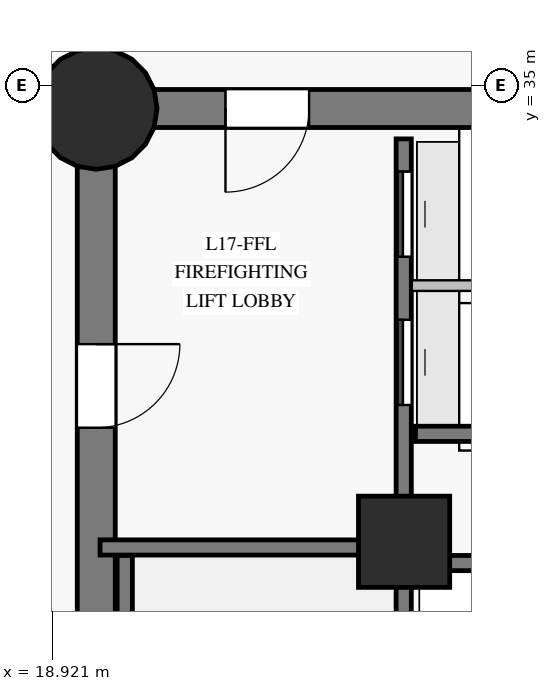
"""IFC4 building model, lengths in metres.
Left out: names, types, materials, properties, quantities, classifications, styles, units other than length and angle.
Written with IfcOpenShell. Run it as: python <this file> out.ifc"""

import sys

from ifc_helpers import new_model, si_unit, direction, frame, frame_2d, origin, origin_with_axes, origin_2d, place, context, subcontext, project, spatial, rectangle, circle, extrude, source, transform, mapped, element, fill, save


model = new_model("IFC4")
c1 = context("Model", 3, precision=1e-05, world=origin(), true_north=direction((0.0, 1.0)))
c2 = subcontext(c1, "Body", "Model", "MODEL_VIEW")
j1 = project(units=[si_unit("LENGTHUNIT", "METRE"), si_unit("PLANEANGLEUNIT", "RADIAN")], contexts=[c1])
p1 = place(None, origin())
s1 = spatial("IfcSite", under=j1, at=p1, CompositionType="ELEMENT")
p2 = place(p1, origin())
s2 = spatial("IfcBuilding", under=s1, at=p2, CompositionType="ELEMENT")
p3 = place(p2, frame((0.0, 0.0, 66.1)))
s3 = spatial("IfcBuildingStorey", under=s2, at=p3, CompositionType="ELEMENT", Elevation=66.1)
p4 = place(p3, frame((26.55, 34.7, 0.0), z_axis=(0.0, 0.0, 1.0), x_axis=(-1.0, 0.0, 0.0)))
e1 = element("IfcWall", 1, at=p4, inside=s3, PredefinedType="SHEAR", context=c2, shape_type="SweptSolid", body=[
    extrude(rectangle(XDim=7.05, YDim=0.5, at=frame_2d((3.525, 0.0))), origin(), (0.0, 0.0, 1.0), 3.35),
])
p5 = place(p4, frame((4.25, 0.0, 0.0)))
e2 = element("IfcOpeningElement", 2, at=p5, cuts=e1, PredefinedType="OPENING", context=c2, shape_type="SweptSolid", body=[
    extrude(rectangle(XDim=1.1, YDim=2.15, at=frame_2d((0.55, 1.075))), frame((0.0, 0.26, 0.0), z_axis=(0.0, -1.0, 0.0), x_axis=(1.0, 0.0, 0.0)), (0.0, 0.0, 1.0), 0.52),
])
p6 = place(p3, frame((19.5, 34.7, 0.0), z_axis=(0.0, 0.0, 1.0), x_axis=(0.0, -1.0, 0.0)))
e3 = element("IfcWall", 3, at=p6, inside=s3, PredefinedType="SHEAR", context=c2, shape_type="SweptSolid", body=[
    extrude(rectangle(XDim=16.4, YDim=0.5, at=frame_2d((8.2, 0.0))), origin(), (0.0, 0.0, 1.0), 3.35),
])
p7 = place(p6, frame((3.1, 0.0, 0.0)))
e4 = element("IfcOpeningElement", 4, at=p7, cuts=e3, PredefinedType="OPENING", context=c2, shape_type="SweptSolid", body=[
    extrude(rectangle(XDim=1.1, YDim=2.15, at=frame_2d((0.55, 1.075))), frame((0.0, 0.26, 0.0), z_axis=(0.0, -1.0, 0.0), x_axis=(1.0, 0.0, 0.0)), (0.0, 0.0, 1.0), 0.52),
])
m1 = source(origin_with_axes(), c2, "Body", "SweptSolid", [
    extrude(circle(Radius=0.8, at=origin_2d()), origin(), (0.0, 0.0, 1.0), 3.6),
])
p8 = place(p3, frame((19.5, 34.7, 0.0), z_axis=(0.0, 0.0, 1.0), x_axis=(1.0, 0.0, 0.0)))
e5 = element("IfcColumn", 5, at=p8, inside=s3, PredefinedType="COLUMN", context=c2, shape_type="MappedRepresentation", body=[
    mapped(m1, transform((0.0, 0.0, 0.0), scale=1.0)),
])
m2 = source(origin_with_axes(), c2, "Body", "SweptSolid", [
    extrude(rectangle(XDim=1.2, YDim=1.2, at=origin_2d()), origin(), (0.0, 0.0, 1.0), 3.6),
])
p9 = place(p3, frame((23.55, 29.0, 0.0), z_axis=(0.0, 0.0, 1.0), x_axis=(1.0, 0.0, 0.0)))
e6 = element("IfcColumn", 6, at=p9, inside=s3, PredefinedType="COLUMN", context=c2, shape_type="MappedRepresentation", body=[
    mapped(m2, transform((0.0, 0.0, 0.0), scale=1.0)),
])
p10 = place(p3, frame((23.545, 18.7, 0.0), z_axis=(0.0, 0.0, 1.0), x_axis=(0.0, 1.0, 0.0)))
e7 = element("IfcWall", 7, at=p10, inside=s3, PredefinedType="SHEAR", context=c2, shape_type="SweptSolid", body=[
    extrude(rectangle(XDim=15.6, YDim=0.2, at=frame_2d((7.8, 0.0))), origin(), (0.0, 0.0, 1.0), 3.35),
])
p11 = place(p10, frame((2.75, 0.0, 0.0)))
e8 = element("IfcOpeningElement", 8, at=p11, cuts=e7, PredefinedType="OPENING", context=c2, shape_type="SweptSolid", body=[
    extrude(rectangle(XDim=1.15, YDim=2.15, at=frame_2d((0.575, 1.075))), frame((0.0, 0.11, 0.0), z_axis=(0.0, -1.0, 0.0), x_axis=(1.0, 0.0, 0.0)), (0.0, 0.0, 1.0), 0.22),
])
p12 = place(p10, frame((0.14, 0.0, 0.0)))
e9 = element("IfcOpeningElement", 9, at=p12, cuts=e7, PredefinedType="OPENING", context=c2, shape_type="SweptSolid", body=[
    extrude(rectangle(XDim=0.88, YDim=2.1, at=frame_2d((0.44, 1.05))), frame((0.0, 0.11, 0.0), z_axis=(0.0, -1.0, 0.0), x_axis=(1.0, 0.0, 0.0)), (0.0, 0.0, 1.0), 0.22),
])
p13 = place(p10, frame((1.36, 0.0, 0.0)))
e10 = element("IfcOpeningElement", 10, at=p13, cuts=e7, PredefinedType="OPENING", context=c2, shape_type="SweptSolid", body=[
    extrude(rectangle(XDim=0.88, YDim=2.1, at=frame_2d((0.44, 1.05))), frame((0.0, 0.11, 0.0), z_axis=(0.0, -1.0, 0.0), x_axis=(1.0, 0.0, 0.0)), (0.0, 0.0, 1.0), 0.22),
])
p14 = place(p10, frame((12.1, 0.0, 0.0)))
e11 = element("IfcOpeningElement", 11, at=p14, cuts=e7, PredefinedType="OPENING", context=c2, shape_type="SweptSolid", body=[
    extrude(rectangle(XDim=1.12, YDim=2.15, at=frame_2d((0.56, 1.075))), frame((0.0, 0.11, 0.0), z_axis=(0.0, -1.0, 0.0), x_axis=(1.0, 0.0, 0.0)), (0.0, 0.0, 1.0), 0.22),
])
p15 = place(p10, frame((14.05, 0.0, 0.0)))
e12 = element("IfcOpeningElement", 12, at=p15, cuts=e7, PredefinedType="OPENING", context=c2, shape_type="SweptSolid", body=[
    extrude(rectangle(XDim=1.12, YDim=2.15, at=frame_2d((0.56, 1.075))), frame((0.0, 0.11, 0.0), z_axis=(0.0, -1.0, 0.0), x_axis=(1.0, 0.0, 0.0)), (0.0, 0.0, 1.0), 0.22),
])
p16 = place(p3, frame((23.7, 28.72, 0.0), z_axis=(0.0, 0.0, 1.0), x_axis=(1.0, 0.0, 0.0)))
e13 = element("IfcWall", 13, at=p16, inside=s3, PredefinedType="SHEAR", context=c2, shape_type="SweptSolid", body=[
    extrude(rectangle(XDim=9.6, YDim=0.2, at=frame_2d((4.8, 0.0))), origin(), (0.0, 0.0, 1.0), 3.35),
])
p17 = place(p3, frame((19.875, 21.32, 0.0), z_axis=(0.0, 0.0, 1.0), x_axis=(0.0, 1.0, 0.0)))
e14 = element("IfcWall", 14, at=p17, inside=s3, PredefinedType="SHEAR", context=c2, shape_type="SweptSolid", body=[
    extrude(rectangle(XDim=7.5, YDim=0.2, at=frame_2d((3.75, 0.0))), origin(), (0.0, 0.0, 1.0), 3.35),
])
p18 = place(p3, frame((19.55, 28.925, 0.0), z_axis=(0.0, 0.0, 1.0), x_axis=(1.0, 0.0, 0.0)))
e15 = element("IfcWall", 15, at=p18, inside=s3, PredefinedType="SHEAR", context=c2, shape_type="SweptSolid", body=[
    extrude(rectangle(XDim=3.995, YDim=0.2, at=frame_2d((1.998, 0.0))), origin(), (0.0, 0.0, 1.0), 3.35),
])
p19 = place(p3, frame((23.7, 30.42, 0.0), z_axis=(0.0, 0.0, 1.0), x_axis=(1.0, 0.0, 0.0)))
e16 = element("IfcWall", 16, at=p19, inside=s3, PredefinedType="SHEAR", context=c2, shape_type="SweptSolid", body=[
    extrude(rectangle(XDim=2.78, YDim=0.2, at=frame_2d((1.39, 0.0))), origin(), (0.0, 0.0, 1.0), 3.35),
])
p20 = place(p3, frame((23.652, 32.37, 0.0), z_axis=(0.0, 0.0, 1.0), x_axis=(1.0, 0.0, 0.0)))
e17 = element("IfcWall", 17, at=p20, inside=s3, PredefinedType="PARTITIONING", context=c2, shape_type="SweptSolid", body=[
    extrude(rectangle(XDim=2.828, YDim=0.14, at=frame_2d((1.414, 0.0))), origin(), (0.0, 0.0, 1.0), 3.35),
])
m3 = source(origin_with_axes(), c2, "Body", "SweptSolid", [
    extrude(rectangle(XDim=1.1, YDim=2.15, at=frame_2d((0.55, 1.075))), frame((0.0, 0.025, 0.0), z_axis=(0.0, -1.0, 0.0), x_axis=(1.0, 0.0, 0.0)), (0.0, 0.0, 1.0), 0.05),
])
p21 = place(p5, origin())
e18 = element("IfcDoor", 18, at=p21, inside=s3, OperationType="SINGLE_SWING_RIGHT", PredefinedType="DOOR", context=c2, shape_type="MappedRepresentation", body=[
    mapped(m3, transform((0.0, 0.0, 0.0), scale=1.0)),
])
fill(e2, e18)
p22 = place(p7, origin())
e19 = element("IfcDoor", 19, at=p22, inside=s3, OperationType="SINGLE_SWING_LEFT", PredefinedType="DOOR", context=c2, shape_type="MappedRepresentation", body=[
    mapped(m3, transform((0.0, 0.0, 0.0), scale=1.0)),
])
fill(e4, e19)
m4 = source(origin_with_axes(), c2, "Body", "SweptSolid", [
    extrude(rectangle(XDim=1.12, YDim=2.15, at=frame_2d((0.56, 1.075))), frame((0.0, 0.025, 0.0), z_axis=(0.0, -1.0, 0.0), x_axis=(1.0, 0.0, 0.0)), (0.0, 0.0, 1.0), 0.05),
])
p23 = place(p14, origin())
e20 = element("IfcDoor", 20, at=p23, inside=s3, OperationType="SLIDING_TO_LEFT", PredefinedType="DOOR", context=c2, shape_type="MappedRepresentation", body=[
    mapped(m4, transform((0.0, 0.0, 0.0), scale=1.0)),
])
fill(e11, e20)
p24 = place(p15, origin())
e21 = element("IfcDoor", 21, at=p24, inside=s3, OperationType="SLIDING_TO_RIGHT", PredefinedType="DOOR", context=c2, shape_type="MappedRepresentation", body=[
    mapped(m4, transform((0.0, 0.0, 0.0), scale=1.0)),
])
fill(e12, e21)
save(model, sys.argv[1])
